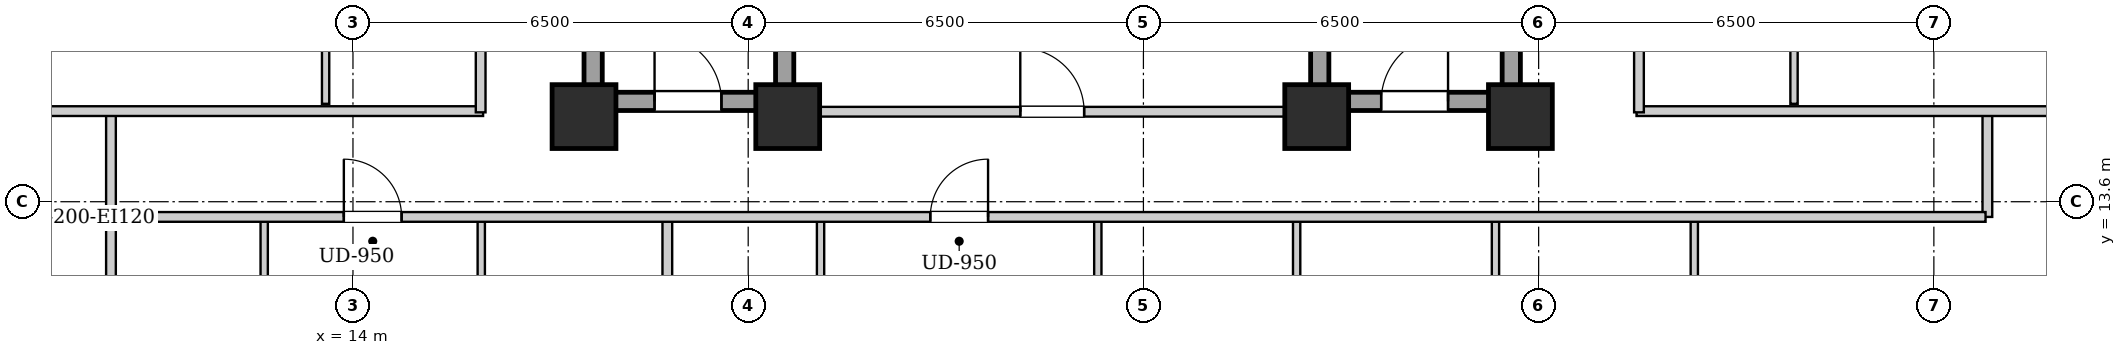
"""IFC4 building model, lengths in metres.
Left out: names, types, materials, properties, quantities, classifications, styles, units other than length and angle.
Written with IfcOpenShell. Run it as: python <this file> out.ifc"""

import sys

from ifc_helpers import new_model, si_unit, direction, frame, frame_2d, origin, origin_2d, place, context, subcontext, project, spatial, rectangle, extrude, element, fill, save


model = new_model("IFC4")
c1 = context("Model", 3, precision=1e-05, world=origin(), true_north=direction((0.0, 1.0)))
c2 = subcontext(c1, "Body", "Model", "MODEL_VIEW")
j1 = project(units=[si_unit("LENGTHUNIT", "METRE"), si_unit("PLANEANGLEUNIT", "RADIAN")], contexts=[c1])
p1 = place(None, origin())
s1 = spatial("IfcSite", under=j1, at=p1, CompositionType="ELEMENT")
p2 = place(p1, origin())
s2 = spatial("IfcBuilding", under=s1, at=p2, CompositionType="ELEMENT")
p3 = place(p2, frame((0.0, 0.0, 81.5)))
s3 = spatial("IfcBuildingStorey", under=s2, at=p3, CompositionType="ELEMENT", Elevation=81.5)
for number, where, z_axis, x_axis in (
    (1, (17.8, 15.0, 0.0), (0.0, 0.0, 1.0), (1.0, 0.0, 0.0)),
    (2, (21.15, 15.0, 0.0), (0.0, 0.0, 1.0), (1.0, 0.0, 0.0)),
    (3, (29.85, 15.0, 0.0), (0.0, 0.0, 1.0), (1.0, 0.0, 0.0)),
    (4, (33.2, 15.0, 0.0), (0.0, 0.0, 1.0), (1.0, 0.0, 0.0)),
):
    element("IfcColumn", number, at=place(p3, frame(where, z_axis=z_axis, x_axis=x_axis)), inside=s3, PredefinedType="COLUMN", context=c2, shape_type="SweptSolid", body=[
        extrude(rectangle(XDim=1.05, YDim=1.05, at=origin_2d()), origin(), (0.0, 0.0, 1.0), 3.2),
    ])
for number, where, z_axis, x_axis in (
    (5, (17.95, 15.1, 0.0), (0.0, 0.0, 1.0), (0.0, 1.0, 0.0)),
    (6, (21.1, 15.1, 0.0), (0.0, 0.0, 1.0), (0.0, 1.0, 0.0)),
):
    element("IfcWall", number, at=place(p3, frame(where, z_axis=z_axis, x_axis=x_axis)), inside=s3, PredefinedType="SHEAR", context=c2, shape_type="SweptSolid", body=[
        extrude(rectangle(XDim=9.0, YDim=0.3, at=frame_2d((4.5, 0.0))), origin(), (0.0, 0.0, 1.0), 2.94),
    ])
p4 = place(p3, frame((18.1, 15.25, 0.0), z_axis=(0.0, 0.0, 1.0), x_axis=(1.0, 0.0, 0.0)))
e7 = element("IfcWall", 7, at=p4, inside=s3, PredefinedType="SHEAR", context=c2, shape_type="SweptSolid", body=[
    extrude(rectangle(XDim=2.85, YDim=0.3, at=frame_2d((1.425, 0.0))), origin(), (0.0, 0.0, 1.0), 2.94),
])
p5 = place(p4, frame((0.86, 0.0, 0.0)))
e8 = element("IfcOpeningElement", 8, at=p5, cuts=e7, PredefinedType="OPENING", context=c2, shape_type="SweptSolid", body=[
    extrude(rectangle(XDim=1.1, YDim=2.05, at=frame_2d((0.55, 1.025))), frame((0.0, 0.16, 0.0), z_axis=(0.0, -1.0, 0.0), x_axis=(1.0, 0.0, 0.0)), (0.0, 0.0, 1.0), 0.32),
])
for number, where, z_axis, x_axis in (
    (9, (29.9, 15.1, 0.0), (0.0, 0.0, 1.0), (0.0, 1.0, 0.0)),
    (10, (33.05, 15.1, 0.0), (0.0, 0.0, 1.0), (0.0, 1.0, 0.0)),
):
    element("IfcWall", number, at=place(p3, frame(where, z_axis=z_axis, x_axis=x_axis)), inside=s3, PredefinedType="SHEAR", context=c2, shape_type="SweptSolid", body=[
        extrude(rectangle(XDim=9.0, YDim=0.3, at=frame_2d((4.5, 0.0))), origin(), (0.0, 0.0, 1.0), 2.94),
    ])
p6 = place(p3, frame((30.05, 15.25, 0.0), z_axis=(0.0, 0.0, 1.0), x_axis=(1.0, 0.0, 0.0)))
e11 = element("IfcWall", 11, at=p6, inside=s3, PredefinedType="SHEAR", context=c2, shape_type="SweptSolid", body=[
    extrude(rectangle(XDim=2.85, YDim=0.3, at=frame_2d((1.425, 0.0))), origin(), (0.0, 0.0, 1.0), 2.94),
])
p7 = place(p6, frame((0.86, 0.0, 0.0)))
e12 = element("IfcOpeningElement", 12, at=p7, cuts=e11, PredefinedType="OPENING", context=c2, shape_type="SweptSolid", body=[
    extrude(rectangle(XDim=1.1, YDim=2.05, at=frame_2d((0.55, 1.025))), frame((0.0, 0.16, 0.0), z_axis=(0.0, -1.0, 0.0), x_axis=(1.0, 0.0, 0.0)), (0.0, 0.0, 1.0), 0.32),
])
p8 = place(p3, frame((21.25, 15.08, 0.0), z_axis=(0.0, 0.0, 1.0), x_axis=(1.0, 0.0, 0.0)))
e13 = element("IfcWall", 13, at=p8, inside=s3, PredefinedType="PARTITIONING", context=c2, shape_type="SweptSolid", body=[
    extrude(rectangle(XDim=8.5, YDim=0.16, at=frame_2d((4.25, 0.0))), origin(), (0.0, 0.0, 1.0), 2.309),
])
p9 = place(p8, frame((3.725, 0.0, 0.0)))
e14 = element("IfcOpeningElement", 14, at=p9, cuts=e13, PredefinedType="OPENING", context=c2, shape_type="SweptSolid", body=[
    extrude(rectangle(XDim=1.05, YDim=2.05, at=frame_2d((0.525, 1.025))), frame((0.0, 0.09, 0.0), z_axis=(0.0, -1.0, 0.0), x_axis=(1.0, 0.0, 0.0)), (0.0, 0.0, 1.0), 0.18),
])
for number, where, z_axis, x_axis in (
    (15, (10.02, 13.35, 0.0), (0.0, 0.0, 1.0), (0.0, 1.0, 0.0)),
    (16, (40.88, 13.35, 0.0), (0.0, 0.0, 1.0), (0.0, 1.0, 0.0)),
):
    element("IfcWall", number, at=place(p3, frame(where, z_axis=z_axis, x_axis=x_axis)), inside=s3, PredefinedType="PARTITIONING", context=c2, shape_type="SweptSolid", body=[
        extrude(rectangle(XDim=1.74, YDim=0.16, at=frame_2d((0.87, 0.0))), origin(), (0.0, 0.0, 1.0), 2.94),
    ])
p10 = place(p3, frame((7.78, 15.09, 0.0), z_axis=(0.0, 0.0, 1.0), x_axis=(1.0, 0.0, 0.0)))
e17 = element("IfcWall", 17, at=p10, inside=s3, PredefinedType="PARTITIONING", context=c2, shape_type="SweptSolid", body=[
    extrude(rectangle(XDim=8.36, YDim=0.16, at=frame_2d((4.18, 0.0))), origin(), (0.0, 0.0, 1.0), 2.309),
])
p11 = place(p3, frame((35.11, 15.09, 0.0), z_axis=(0.0, 0.0, 1.0), x_axis=(1.0, 0.0, 0.0)))
e18 = element("IfcWall", 18, at=p11, inside=s3, PredefinedType="PARTITIONING", context=c2, shape_type="SweptSolid", body=[
    extrude(rectangle(XDim=8.01, YDim=0.16, at=frame_2d((4.005, 0.0))), origin(), (0.0, 0.0, 1.0), 2.309),
])
p12 = place(p3, frame((10.02, 10.4, 0.0), z_axis=(0.0, 0.0, 1.0), x_axis=(0.0, 1.0, 0.0)))
e19 = element("IfcWall", 19, at=p12, inside=s3, PredefinedType="PARTITIONING", context=c2, shape_type="SweptSolid", body=[
    extrude(rectangle(XDim=2.91, YDim=0.16, at=frame_2d((1.455, 0.0))), origin(), (0.0, 0.0, 1.0), 2.94),
])
p13 = place(p3, frame((12.54, 10.46, 0.0), z_axis=(0.0, 0.0, 1.0), x_axis=(0.0, 1.0, 0.0)))
e20 = element("IfcWall", 20, at=p13, inside=s3, PredefinedType="PARTITIONING", context=c2, shape_type="SweptSolid", body=[
    extrude(rectangle(XDim=2.85, YDim=0.12, at=frame_2d((1.425, 0.0))), origin(), (0.0, 0.0, 1.0), 2.94),
])
p14 = place(p13, frame((0.995, 0.0, 0.0)))
e21 = element("IfcOpeningElement", 21, at=p14, cuts=e20, PredefinedType="OPENING", context=c2, shape_type="SweptSolid", body=[
    extrude(rectangle(XDim=0.86, YDim=2.05, at=frame_2d((0.43, 1.025))), frame((0.0, 0.07, 0.0), z_axis=(0.0, -1.0, 0.0), x_axis=(1.0, 0.0, 0.0)), (0.0, 0.0, 1.0), 0.14),
])
p15 = place(p3, frame((16.11, 10.46, 0.0), z_axis=(0.0, 0.0, 1.0), x_axis=(0.0, 1.0, 0.0)))
e22 = element("IfcWall", 22, at=p15, inside=s3, PredefinedType="PARTITIONING", context=c2, shape_type="SweptSolid", body=[
    extrude(rectangle(XDim=2.85, YDim=0.12, at=frame_2d((1.425, 0.0))), origin(), (0.0, 0.0, 1.0), 2.94),
])
p16 = place(p15, frame((0.975, 0.0, 0.0)))
e23 = element("IfcOpeningElement", 23, at=p16, cuts=e22, PredefinedType="OPENING", context=c2, shape_type="SweptSolid", body=[
    extrude(rectangle(XDim=0.9, YDim=2.05, at=frame_2d((0.45, 1.025))), frame((0.0, 0.07, 0.0), z_axis=(0.0, -1.0, 0.0), x_axis=(1.0, 0.0, 0.0)), (0.0, 0.0, 1.0), 0.14),
])
p17 = place(p3, frame((19.17, 0.28, 0.0), z_axis=(0.0, 0.0, 1.0), x_axis=(0.0, 1.0, 0.0)))
e24 = element("IfcWall", 24, at=p17, inside=s3, PredefinedType="PARTITIONING", context=c2, shape_type="SweptSolid", body=[
    extrude(rectangle(XDim=13.03, YDim=0.16, at=frame_2d((6.515, 0.0))), origin(), (0.0, 0.0, 1.0), 2.94),
])
p18 = place(p3, frame((21.69, 10.46, 0.0), z_axis=(0.0, 0.0, 1.0), x_axis=(0.0, 1.0, 0.0)))
e25 = element("IfcWall", 25, at=p18, inside=s3, PredefinedType="PARTITIONING", context=c2, shape_type="SweptSolid", body=[
    extrude(rectangle(XDim=2.85, YDim=0.12, at=frame_2d((1.425, 0.0))), origin(), (0.0, 0.0, 1.0), 2.94),
])
p19 = place(p18, frame((0.995, 0.0, 0.0)))
e26 = element("IfcOpeningElement", 26, at=p19, cuts=e25, PredefinedType="OPENING", context=c2, shape_type="SweptSolid", body=[
    extrude(rectangle(XDim=0.86, YDim=2.05, at=frame_2d((0.43, 1.025))), frame((0.0, 0.07, 0.0), z_axis=(0.0, -1.0, 0.0), x_axis=(1.0, 0.0, 0.0)), (0.0, 0.0, 1.0), 0.14),
])
p20 = place(p3, frame((26.25, 10.46, 0.0), z_axis=(0.0, 0.0, 1.0), x_axis=(0.0, 1.0, 0.0)))
e27 = element("IfcWall", 27, at=p20, inside=s3, PredefinedType="PARTITIONING", context=c2, shape_type="SweptSolid", body=[
    extrude(rectangle(XDim=2.85, YDim=0.12, at=frame_2d((1.425, 0.0))), origin(), (0.0, 0.0, 1.0), 2.94),
])
p21 = place(p20, frame((0.975, 0.0, 0.0)))
e28 = element("IfcOpeningElement", 28, at=p21, cuts=e27, PredefinedType="OPENING", context=c2, shape_type="SweptSolid", body=[
    extrude(rectangle(XDim=0.9, YDim=2.05, at=frame_2d((0.45, 1.025))), frame((0.0, 0.07, 0.0), z_axis=(0.0, -1.0, 0.0), x_axis=(1.0, 0.0, 0.0)), (0.0, 0.0, 1.0), 0.14),
])
p22 = place(p3, frame((29.52, 10.46, 0.0), z_axis=(0.0, 0.0, 1.0), x_axis=(0.0, 1.0, 0.0)))
e29 = element("IfcWall", 29, at=p22, inside=s3, PredefinedType="PARTITIONING", context=c2, shape_type="SweptSolid", body=[
    extrude(rectangle(XDim=2.85, YDim=0.12, at=frame_2d((1.425, 0.0))), origin(), (0.0, 0.0, 1.0), 2.94),
])
p23 = place(p22, frame((0.975, 0.0, 0.0)))
e30 = element("IfcOpeningElement", 30, at=p23, cuts=e29, PredefinedType="OPENING", context=c2, shape_type="SweptSolid", body=[
    extrude(rectangle(XDim=0.9, YDim=2.05, at=frame_2d((0.45, 1.025))), frame((0.0, 0.07, 0.0), z_axis=(0.0, -1.0, 0.0), x_axis=(1.0, 0.0, 0.0)), (0.0, 0.0, 1.0), 0.14),
])
p24 = place(p3, frame((32.79, 10.46, 0.0), z_axis=(0.0, 0.0, 1.0), x_axis=(0.0, 1.0, 0.0)))
e31 = element("IfcWall", 31, at=p24, inside=s3, PredefinedType="PARTITIONING", context=c2, shape_type="SweptSolid", body=[
    extrude(rectangle(XDim=2.85, YDim=0.12, at=frame_2d((1.425, 0.0))), origin(), (0.0, 0.0, 1.0), 2.94),
])
p25 = place(p24, frame((0.975, 0.0, 0.0)))
e32 = element("IfcOpeningElement", 32, at=p25, cuts=e31, PredefinedType="OPENING", context=c2, shape_type="SweptSolid", body=[
    extrude(rectangle(XDim=0.9, YDim=2.05, at=frame_2d((0.45, 1.025))), frame((0.0, 0.07, 0.0), z_axis=(0.0, -1.0, 0.0), x_axis=(1.0, 0.0, 0.0)), (0.0, 0.0, 1.0), 0.14),
])
p26 = place(p3, frame((36.06, 10.46, 0.0), z_axis=(0.0, 0.0, 1.0), x_axis=(0.0, 1.0, 0.0)))
e33 = element("IfcWall", 33, at=p26, inside=s3, PredefinedType="PARTITIONING", context=c2, shape_type="SweptSolid", body=[
    extrude(rectangle(XDim=2.85, YDim=0.12, at=frame_2d((1.425, 0.0))), origin(), (0.0, 0.0, 1.0), 2.94),
])
p27 = place(p26, frame((0.975, 0.0, 0.0)))
e34 = element("IfcOpeningElement", 34, at=p27, cuts=e33, PredefinedType="OPENING", context=c2, shape_type="SweptSolid", body=[
    extrude(rectangle(XDim=0.9, YDim=2.05, at=frame_2d((0.45, 1.025))), frame((0.0, 0.07, 0.0), z_axis=(0.0, -1.0, 0.0), x_axis=(1.0, 0.0, 0.0)), (0.0, 0.0, 1.0), 0.14),
])
for number, where, z_axis, x_axis in (
    (35, (13.55, 15.21, 0.0), (0.0, 0.0, 1.0), (0.0, 1.0, 0.0)),
    (36, (37.7, 15.21, 0.0), (0.0, 0.0, 1.0), (0.0, 1.0, 0.0)),
):
    element("IfcWall", number, at=place(p3, frame(where, z_axis=z_axis, x_axis=x_axis)), inside=s3, PredefinedType="PARTITIONING", context=c2, shape_type="SweptSolid", body=[
        extrude(rectangle(XDim=2.3, YDim=0.12, at=frame_2d((1.15, 0.0))), origin(), (0.0, 0.0, 1.0), 2.94),
    ])
p28 = place(p3, frame((10.05, 13.35, 0.0), z_axis=(0.0, 0.0, 1.0), x_axis=(1.0, 0.0, 0.0)))
e37 = element("IfcWall", 37, at=p28, inside=s3, PredefinedType="PARTITIONING", context=c2, shape_type="SweptSolid", body=[
    extrude(rectangle(XDim=30.8, YDim=0.16, at=frame_2d((15.4, 0.0))), origin(), (0.0, 0.0, 1.0), 2.94),
])
p29 = place(p28, frame((3.8, 0.0, 0.0)))
e38 = element("IfcOpeningElement", 38, at=p29, cuts=e37, PredefinedType="OPENING", context=c2, shape_type="SweptSolid", body=[
    extrude(rectangle(XDim=0.95, YDim=2.1, at=frame_2d((0.475, 1.05))), frame((0.0, 0.09, 0.0), z_axis=(0.0, -1.0, 0.0), x_axis=(1.0, 0.0, 0.0)), (0.0, 0.0, 1.0), 0.18),
])
p30 = place(p28, frame((13.445, 0.0, 0.0)))
e39 = element("IfcOpeningElement", 39, at=p30, cuts=e37, PredefinedType="OPENING", context=c2, shape_type="SweptSolid", body=[
    extrude(rectangle(XDim=0.95, YDim=2.1, at=frame_2d((0.475, 1.05))), frame((0.0, 0.09, 0.0), z_axis=(0.0, -1.0, 0.0), x_axis=(1.0, 0.0, 0.0)), (0.0, 0.0, 1.0), 0.18),
])
p31 = place(p3, frame((16.1, 15.07, 0.0), z_axis=(0.0, 0.0, 1.0), x_axis=(0.0, 1.0, 0.0)))
e40 = element("IfcWall", 40, at=p31, inside=s3, PredefinedType="PARTITIONING", context=c2, shape_type="SweptSolid", body=[
    extrude(rectangle(XDim=13.93, YDim=0.16, at=frame_2d((6.965, 0.0))), origin(), (0.0, 0.0, 1.0), 2.94),
])
p32 = place(p31, frame((4.385, 0.0, 0.0)))
e41 = element("IfcOpeningElement", 41, at=p32, cuts=e40, PredefinedType="OPENING", context=c2, shape_type="SweptSolid", body=[
    extrude(rectangle(XDim=0.95, YDim=2.1, at=frame_2d((0.475, 1.05))), frame((0.0, 0.09, 0.0), z_axis=(0.0, -1.0, 0.0), x_axis=(1.0, 0.0, 0.0)), (0.0, 0.0, 1.0), 0.18),
])
p33 = place(p3, frame((35.15, 15.07, 0.0), z_axis=(0.0, 0.0, 1.0), x_axis=(0.0, 1.0, 0.0)))
e42 = element("IfcWall", 42, at=p33, inside=s3, PredefinedType="PARTITIONING", context=c2, shape_type="SweptSolid", body=[
    extrude(rectangle(XDim=13.93, YDim=0.16, at=frame_2d((6.965, 0.0))), origin(), (0.0, 0.0, 1.0), 2.94),
])
p34 = place(p33, frame((4.385, 0.0, 0.0)))
e43 = element("IfcOpeningElement", 43, at=p34, cuts=e42, PredefinedType="OPENING", context=c2, shape_type="SweptSolid", body=[
    extrude(rectangle(XDim=0.95, YDim=2.1, at=frame_2d((0.475, 1.05))), frame((0.0, 0.09, 0.0), z_axis=(0.0, -1.0, 0.0), x_axis=(1.0, 0.0, 0.0)), (0.0, 0.0, 1.0), 0.18),
])
p35 = place(p5, origin())
e44 = element("IfcDoor", 44, at=p35, inside=s3, OperationType="SINGLE_SWING_LEFT", PredefinedType="DOOR", context=c2, shape_type="SweptSolid", body=[
    extrude(rectangle(XDim=1.1, YDim=2.05, at=frame_2d((0.55, 1.025))), frame((0.0, 0.025, 0.0), z_axis=(0.0, -1.0, 0.0), x_axis=(1.0, 0.0, 0.0)), (0.0, 0.0, 1.0), 0.05),
])
fill(e8, e44)
p36 = place(p7, origin())
e45 = element("IfcDoor", 45, at=p36, inside=s3, OperationType="SINGLE_SWING_RIGHT", PredefinedType="DOOR", context=c2, shape_type="SweptSolid", body=[
    extrude(rectangle(XDim=1.1, YDim=2.05, at=frame_2d((0.55, 1.025))), frame((0.0, 0.025, 0.0), z_axis=(0.0, -1.0, 0.0), x_axis=(1.0, 0.0, 0.0)), (0.0, 0.0, 1.0), 0.05),
])
fill(e12, e45)
p37 = place(p9, origin())
e46 = element("IfcDoor", 46, at=p37, inside=s3, OperationType="SINGLE_SWING_LEFT", PredefinedType="DOOR", context=c2, shape_type="SweptSolid", body=[
    extrude(rectangle(XDim=1.05, YDim=2.05, at=frame_2d((0.525, 1.025))), frame((0.0, 0.025, 0.0), z_axis=(0.0, -1.0, 0.0), x_axis=(1.0, 0.0, 0.0)), (0.0, 0.0, 1.0), 0.05),
])
fill(e14, e46)
p38 = place(p29, origin())
e47 = element("IfcDoor", 47, at=p38, inside=s3, OperationType="SINGLE_SWING_LEFT", PredefinedType="DOOR", context=c2, shape_type="SweptSolid", body=[
    extrude(rectangle(XDim=0.95, YDim=2.1, at=frame_2d((0.475, 1.05))), frame((0.0, 0.025, 0.0), z_axis=(0.0, -1.0, 0.0), x_axis=(1.0, 0.0, 0.0)), (0.0, 0.0, 1.0), 0.05),
])
fill(e38, e47)
p39 = place(p30, origin())
e48 = element("IfcDoor", 48, at=p39, inside=s3, OperationType="SINGLE_SWING_RIGHT", PredefinedType="DOOR", context=c2, shape_type="SweptSolid", body=[
    extrude(rectangle(XDim=0.95, YDim=2.1, at=frame_2d((0.475, 1.05))), frame((0.0, 0.025, 0.0), z_axis=(0.0, -1.0, 0.0), x_axis=(1.0, 0.0, 0.0)), (0.0, 0.0, 1.0), 0.05),
])
fill(e39, e48)
save(model, sys.argv[1])
